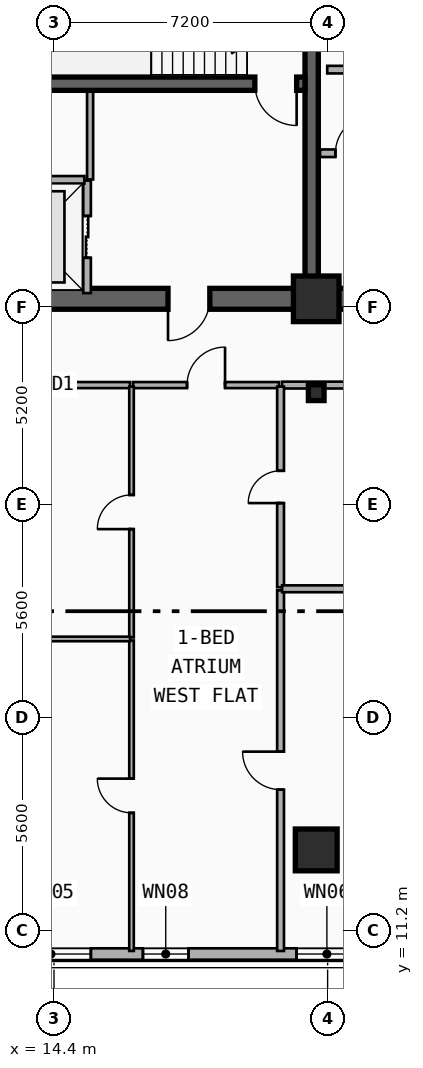
"""IFC4 building model, lengths in metres.
Left out: names, types, materials, properties, quantities, classifications, styles, units other than length and angle.
Written with IfcOpenShell. Run it as: python <this file> out.ifc"""

import sys

from ifc_helpers import new_model, si_unit, direction, frame, frame_2d, origin, origin_2d, place, context, subcontext, project, spatial, rectangle, i_section, extrude, element, fill, save


model = new_model("IFC4")
c1 = context("Model", 3, precision=1e-05, world=origin(), true_north=direction((0.0, 1.0)))
c2 = subcontext(c1, "Body", "Model", "MODEL_VIEW")
j1 = project(units=[si_unit("LENGTHUNIT", "METRE"), si_unit("PLANEANGLEUNIT", "RADIAN")], contexts=[c1])
p1 = place(None, origin())
s1 = spatial("IfcSite", under=j1, at=p1, CompositionType="ELEMENT")
p2 = place(p1, origin())
s2 = spatial("IfcBuilding", under=s1, at=p2, CompositionType="ELEMENT")
p3 = place(p2, frame((0.0, 0.0, 141.25)))
s3 = spatial("IfcBuildingStorey", under=s2, at=p3, CompositionType="ELEMENT", Elevation=141.25)
p4 = place(p3, frame((21.18, 27.82, 0.0), z_axis=(0.0, 0.0, 1.0), x_axis=(-1.0, 0.0, 0.0)))
e1 = element("IfcWall", 1, at=p4, inside=s3, PredefinedType="SHEAR", context=c2, shape_type="SweptSolid", body=[
    extrude(rectangle(XDim=9.03, YDim=0.55, at=frame_2d((4.515, 0.0))), origin(), (0.0, 0.0, 1.0), 3.55),
])
p5 = place(p4, frame((2.68, 0.0, 0.0)))
e2 = element("IfcOpeningElement", 2, at=p5, cuts=e1, PredefinedType="OPENING", context=c2, shape_type="SweptSolid", body=[
    extrude(rectangle(XDim=1.1, YDim=2.15, at=frame_2d((0.55, 1.075))), frame((0.0, 0.285, 0.0), z_axis=(0.0, -1.0, 0.0), x_axis=(1.0, 0.0, 0.0)), (0.0, 0.0, 1.0), 0.57),
])
p6 = place(p3, frame((33.15, 27.82, 0.0), z_axis=(0.0, 0.0, 1.0), x_axis=(-1.0, 0.0, 0.0)))
e3 = element("IfcWall", 3, at=p6, inside=s3, PredefinedType="SHEAR", context=c2, shape_type="SweptSolid", body=[
    extrude(rectangle(XDim=11.97, YDim=0.55, at=frame_2d((5.985, 0.0))), origin(), (0.0, 0.0, 1.0), 3.55),
])
p7 = place(p6, frame((6.1, 0.0, 0.0)))
e4 = element("IfcOpeningElement", 4, at=p7, cuts=e3, PredefinedType="OPENING", context=c2, shape_type="SweptSolid", body=[
    extrude(rectangle(XDim=1.6, YDim=2.2, at=frame_2d((0.8, 1.1))), frame((0.0, 0.285, 0.0), z_axis=(0.0, -1.0, 0.0), x_axis=(1.0, 0.0, 0.0)), (0.0, 0.0, 1.0), 0.57),
])
p8 = place(p3, frame((21.18, 28.095, 0.0), z_axis=(0.0, 0.0, 1.0), x_axis=(0.0, 1.0, 0.0)))
e5 = element("IfcWall", 5, at=p8, inside=s3, PredefinedType="SHEAR", context=c2, shape_type="SweptSolid", body=[
    extrude(rectangle(XDim=8.68, YDim=0.35, at=frame_2d((4.34, 0.0))), origin(), (0.0, 0.0, 1.0), 3.55),
])
p9 = place(p3, frame((21.005, 33.48, 0.0), z_axis=(0.0, 0.0, 1.0), x_axis=(-1.0, 0.0, 0.0)))
e6 = element("IfcWall", 6, at=p9, inside=s3, PredefinedType="SHEAR", context=c2, shape_type="SweptSolid", body=[
    extrude(rectangle(XDim=8.58, YDim=0.35, at=frame_2d((4.29, 0.0))), origin(), (0.0, 0.0, 1.0), 3.55),
])
p10 = place(p9, frame((0.22, 0.0, 0.0)))
e7 = element("IfcOpeningElement", 7, at=p10, cuts=e6, PredefinedType="OPENING", context=c2, shape_type="SweptSolid", body=[
    extrude(rectangle(XDim=1.1, YDim=2.15, at=frame_2d((0.55, 1.075))), frame((0.0, 0.185, 0.0), z_axis=(0.0, -1.0, 0.0), x_axis=(1.0, 0.0, 0.0)), (0.0, 0.0, 1.0), 0.37),
])
p11 = place(p3, frame((21.3, 27.82, 0.0), z_axis=(0.0, 0.0, 1.0), x_axis=(1.0, 0.0, 0.0)))
e8 = element("IfcColumn", 8, at=p11, inside=s3, PredefinedType="COLUMN", context=c2, shape_type="SweptSolid", body=[
    extrude(rectangle(XDim=1.2, YDim=1.2, at=origin_2d()), origin(), (0.0, 0.0, 1.0), 3.55),
])
p12 = place(p3, frame((21.3, 25.35, 0.0), z_axis=(0.0, 0.0, 1.0), x_axis=(1.0, 0.0, 0.0)))
e9 = element("IfcColumn", 9, at=p12, inside=s3, PredefinedType="COLUMN", context=c2, shape_type="SweptSolid", body=[
    extrude(i_section(OverallWidth=0.413, OverallDepth=0.415, WebThickness=0.03, FlangeThickness=0.047, FilletRadius=0.015, at=origin_2d()), origin(), (0.0, 0.0, 1.0), 3.55),
])
p13 = place(p3, frame((21.3, 13.428, 0.0), z_axis=(0.0, -0.0902702026, 0.995917311087), x_axis=(1.0, 0.0, 0.0)))
e10 = element("IfcColumn", 10, at=p13, inside=s3, PredefinedType="COLUMN", context=c2, shape_type="SweptSolid", body=[
    extrude(rectangle(XDim=1.1, YDim=1.1, at=origin_2d()), origin(), (0.0, 0.0, 1.0), 3.565),
])
p14 = place(p3, frame((48.0, 10.58, 0.0), z_axis=(0.0, 0.0, 1.0), x_axis=(-1.0, 0.0, 0.0)))
e11 = element("IfcWall", 11, at=p14, inside=s3, PredefinedType="SOLIDWALL", context=c2, shape_type="SweptSolid", body=[
    extrude(rectangle(XDim=38.4, YDim=0.3, at=frame_2d((19.2, 0.0))), origin(), (0.0, 0.0, 1.0), 3.29),
])
p15 = place(p14, frame((36.19, 0.0, 0.48)))
e12 = element("IfcOpeningElement", 12, at=p15, cuts=e11, PredefinedType="OPENING", context=c2, shape_type="SweptSolid", body=[
    extrude(rectangle(XDim=1.8, YDim=1.8, at=frame_2d((0.9, 0.9))), frame((0.0, 0.16, 0.0), z_axis=(0.0, -1.0, 0.0), x_axis=(1.0, 0.0, 0.0)), (0.0, 0.0, 1.0), 0.32),
])
p16 = place(p14, frame((30.06, 0.0, 0.68)))
e13 = element("IfcOpeningElement", 13, at=p16, cuts=e11, PredefinedType="OPENING", context=c2, shape_type="SweptSolid", body=[
    extrude(rectangle(XDim=1.2, YDim=1.5, at=frame_2d((0.6, 0.75))), frame((0.0, 0.16, 0.0), z_axis=(0.0, -1.0, 0.0), x_axis=(1.0, 0.0, 0.0)), (0.0, 0.0, 1.0), 0.32),
])
p17 = place(p14, frame((25.619, 0.0, 0.34)))
e14 = element("IfcOpeningElement", 14, at=p17, cuts=e11, PredefinedType="OPENING", context=c2, shape_type="SweptSolid", body=[
    extrude(rectangle(XDim=1.6, YDim=1.95, at=frame_2d((0.8, 0.975))), frame((0.0, 0.16, 0.0), z_axis=(0.0, -1.0, 0.0), x_axis=(1.0, 0.0, 0.0)), (0.0, 0.0, 1.0), 0.32),
])
p18 = place(p14, frame((32.63, 0.0, 0.65)))
e15 = element("IfcOpeningElement", 15, at=p18, cuts=e11, PredefinedType="OPENING", context=c2, shape_type="SweptSolid", body=[
    extrude(rectangle(XDim=2.1, YDim=2.1, at=frame_2d((1.05, 1.05))), frame((0.0, 0.16, 0.0), z_axis=(0.0, -1.0, 0.0), x_axis=(1.0, 0.0, 0.0)), (0.0, 0.0, 1.0), 0.32),
])
p19 = place(p14, frame((20.1, 0.0, 0.65)))
e16 = element("IfcOpeningElement", 16, at=p19, cuts=e11, PredefinedType="OPENING", context=c2, shape_type="SweptSolid", body=[
    extrude(rectangle(XDim=2.1, YDim=2.1, at=frame_2d((1.05, 1.05))), frame((0.0, 0.16, 0.0), z_axis=(0.0, -1.0, 0.0), x_axis=(1.0, 0.0, 0.0)), (0.0, 0.0, 1.0), 0.32),
])
p20 = place(p14, frame((22.95, 0.0, 0.8)))
e17 = element("IfcOpeningElement", 17, at=p20, cuts=e11, PredefinedType="OPENING", context=c2, shape_type="SweptSolid", body=[
    extrude(rectangle(XDim=1.8, YDim=1.8, at=frame_2d((0.9, 0.9))), frame((0.0, 0.16, 0.0), z_axis=(0.0, -1.0, 0.0), x_axis=(1.0, 0.0, 0.0)), (0.0, 0.0, 1.0), 0.32),
])
p21 = place(p14, frame((13.35, 0.0, 0.65)))
e18 = element("IfcOpeningElement", 18, at=p21, cuts=e11, PredefinedType="OPENING", context=c2, shape_type="SweptSolid", body=[
    extrude(rectangle(XDim=2.1, YDim=2.1, at=frame_2d((1.05, 1.05))), frame((0.0, 0.16, 0.0), z_axis=(0.0, -1.0, 0.0), x_axis=(1.0, 0.0, 0.0)), (0.0, 0.0, 1.0), 0.32),
])
p22 = place(p14, frame((6.944, 0.0, 0.65)))
e19 = element("IfcOpeningElement", 19, at=p22, cuts=e11, PredefinedType="OPENING", context=c2, shape_type="SweptSolid", body=[
    extrude(rectangle(XDim=2.1, YDim=2.1, at=frame_2d((1.05, 1.05))), frame((0.0, 0.16, 0.0), z_axis=(0.0, -1.0, 0.0), x_axis=(1.0, 0.0, 0.0)), (0.0, 0.0, 1.0), 0.32),
])
p23 = place(p14, frame((2.9, 0.0, 0.48)))
e20 = element("IfcOpeningElement", 20, at=p23, cuts=e11, PredefinedType="OPENING", context=c2, shape_type="SweptSolid", body=[
    extrude(rectangle(XDim=1.4, YDim=1.8, at=frame_2d((0.7, 0.9))), frame((0.0, 0.16, 0.0), z_axis=(0.0, -1.0, 0.0), x_axis=(1.0, 0.0, 0.0)), (0.0, 0.0, 1.0), 0.32),
])
p24 = place(p14, frame((0.41, 0.0, 0.48)))
e21 = element("IfcOpeningElement", 21, at=p24, cuts=e11, PredefinedType="OPENING", context=c2, shape_type="SweptSolid", body=[
    extrude(rectangle(XDim=1.8, YDim=1.8, at=frame_2d((0.9, 0.9))), frame((0.0, 0.16, 0.0), z_axis=(0.0, -1.0, 0.0), x_axis=(1.0, 0.0, 0.0)), (0.0, 0.0, 1.0), 0.32),
])
p25 = place(p3, frame((15.27, 27.97, 0.0), z_axis=(0.0, 0.0, 1.0), x_axis=(0.0, 1.0, 0.0)))
e22 = element("IfcWall", 22, at=p25, inside=s3, PredefinedType="PARTITIONING", context=c2, shape_type="SweptSolid", body=[
    extrude(rectangle(XDim=2.96, YDim=0.2, at=frame_2d((1.48, 0.0))), origin(), (0.0, 0.0, 1.0), 2.36),
])
p26 = place(p25, frame((0.93, 0.0, 0.0)))
e23 = element("IfcOpeningElement", 23, at=p26, cuts=e22, PredefinedType="OPENING", context=c2, shape_type="SweptSolid", body=[
    extrude(rectangle(XDim=1.1, YDim=2.15, at=frame_2d((0.55, 1.075))), frame((0.0, 0.11, 0.0), z_axis=(0.0, -1.0, 0.0), x_axis=(1.0, 0.0, 0.0)), (0.0, 0.0, 1.0), 0.22),
])
p27 = place(p3, frame((12.45, 30.95, 0.0), z_axis=(0.0, 0.0, 1.0), x_axis=(1.0, 0.0, 0.0)))
e24 = element("IfcWall", 24, at=p27, inside=s3, PredefinedType="PARTITIONING", context=c2, shape_type="SweptSolid", body=[
    extrude(rectangle(XDim=2.75, YDim=0.2, at=frame_2d((1.375, 0.0))), origin(), (0.0, 0.0, 1.0), 2.36),
])
p28 = place(p3, frame((21.4, 31.65, 0.0), z_axis=(0.0, 0.0, 1.0), x_axis=(1.0, 0.0, 0.0)))
e25 = element("IfcWall", 25, at=p28, inside=s3, PredefinedType="PARTITIONING", context=c2, shape_type="SweptSolid", body=[
    extrude(rectangle(XDim=1.81, YDim=0.2, at=frame_2d((0.905, 0.0))), origin(), (0.0, 0.0, 1.0), 2.36),
])
p29 = place(p28, frame((0.405, 0.0, 0.0)))
e26 = element("IfcOpeningElement", 26, at=p29, cuts=e25, PredefinedType="OPENING", context=c2, shape_type="SweptSolid", body=[
    extrude(rectangle(XDim=1.0, YDim=2.15, at=frame_2d((0.5, 1.075))), frame((0.0, 0.11, 0.0), z_axis=(0.0, -1.0, 0.0), x_axis=(1.0, 0.0, 0.0)), (0.0, 0.0, 1.0), 0.22),
])
p30 = place(p3, frame((21.59, 33.85, 0.0), z_axis=(0.0, 0.0, 1.0), x_axis=(1.0, 0.0, 0.0)))
e27 = element("IfcWall", 27, at=p30, inside=s3, PredefinedType="PARTITIONING", context=c2, shape_type="SweptSolid", body=[
    extrude(rectangle(XDim=5.92, YDim=0.2, at=frame_2d((2.96, 0.0))), origin(), (0.0, 0.0, 1.0), 2.36),
])
p31 = place(p30, frame((2.36, 0.0, 0.0)))
e28 = element("IfcOpeningElement", 28, at=p31, cuts=e27, PredefinedType="OPENING", context=c2, shape_type="SweptSolid", body=[
    extrude(rectangle(XDim=1.2, YDim=2.15, at=frame_2d((0.6, 1.075))), frame((0.0, 0.11, 0.0), z_axis=(0.0, -1.0, 0.0), x_axis=(1.0, 0.0, 0.0)), (0.0, 0.0, 1.0), 0.22),
])
p32 = place(p3, frame((16.48, 25.55, 0.0), z_axis=(0.0, 0.0, 1.0), x_axis=(1.0, 0.0, 0.0)))
e29 = element("IfcWall", 29, at=p32, inside=s3, PredefinedType="PARTITIONING", context=c2, shape_type="SweptSolid", body=[
    extrude(rectangle(XDim=3.842, YDim=0.16, at=frame_2d((1.921, 0.0))), origin(), (0.0, 0.0, 1.0), 3.29),
])
p33 = place(p32, frame((1.421, 0.0, 0.0)))
e30 = element("IfcOpeningElement", 30, at=p33, cuts=e29, PredefinedType="OPENING", context=c2, shape_type="SweptSolid", body=[
    extrude(rectangle(XDim=1.0, YDim=2.15, at=frame_2d((0.5, 1.075))), frame((0.0, 0.09, 0.0), z_axis=(0.0, -1.0, 0.0), x_axis=(1.0, 0.0, 0.0)), (0.0, 0.0, 1.0), 0.18),
])
p34 = place(p3, frame((20.402, 25.55, 0.0), z_axis=(0.0, 0.0, 1.0), x_axis=(1.0, 0.0, 0.0)))
e31 = element("IfcWall", 31, at=p34, inside=s3, PredefinedType="PLUMBINGWALL", context=c2, shape_type="SweptSolid", body=[
    extrude(rectangle(XDim=2.358, YDim=0.18, at=frame_2d((1.179, 0.0))), origin(), (0.0, 0.0, 1.0), 2.456),
])
p35 = place(p3, frame((12.24, 25.55, 0.0), z_axis=(0.0, 0.0, 1.0), x_axis=(1.0, 0.0, 0.0)))
e32 = element("IfcWall", 32, at=p35, inside=s3, PredefinedType="PARTITIONING", context=c2, shape_type="SweptSolid", body=[
    extrude(rectangle(XDim=4.16, YDim=0.16, at=frame_2d((2.08, 0.0))), origin(), (0.0, 0.0, 1.0), 2.456),
])
p36 = place(p3, frame((20.362, 10.66, 0.0), z_axis=(0.0, 0.0, 1.0), x_axis=(0.0, 1.0, 0.0)))
e33 = element("IfcWall", 33, at=p36, inside=s3, PredefinedType="PLUMBINGWALL", context=c2, shape_type="SweptSolid", body=[
    extrude(rectangle(XDim=9.49, YDim=0.18, at=frame_2d((4.745, 0.0))), origin(), (0.0, 0.0, 1.0), 2.72),
])
p37 = place(p36, frame((4.245, 0.0, 0.0)))
e34 = element("IfcOpeningElement", 34, at=p37, cuts=e33, PredefinedType="OPENING", context=c2, shape_type="SweptSolid", body=[
    extrude(rectangle(XDim=1.0, YDim=2.15, at=frame_2d((0.5, 1.075))), frame((0.0, 0.1, 0.0), z_axis=(0.0, -1.0, 0.0), x_axis=(1.0, 0.0, 0.0)), (0.0, 0.0, 1.0), 0.2),
])
p38 = place(p3, frame((20.362, 20.23, 0.0), z_axis=(0.0, 0.0, 1.0), x_axis=(0.0, 1.0, 0.0)))
e35 = element("IfcWall", 35, at=p38, inside=s3, PredefinedType="PLUMBINGWALL", context=c2, shape_type="SweptSolid", body=[
    extrude(rectangle(XDim=5.28, YDim=0.18, at=frame_2d((2.64, 0.0))), origin(), (0.0, 0.0, 1.0), 2.72),
])
p39 = place(p38, frame((2.215, 0.0, 0.0)))
e36 = element("IfcOpeningElement", 36, at=p39, cuts=e35, PredefinedType="OPENING", context=c2, shape_type="SweptSolid", body=[
    extrude(rectangle(XDim=0.85, YDim=2.1, at=frame_2d((0.425, 1.05))), frame((0.0, 0.1, 0.0), z_axis=(0.0, -1.0, 0.0), x_axis=(1.0, 0.0, 0.0)), (0.0, 0.0, 1.0), 0.2),
])
p40 = place(p3, frame((16.44, 10.66, 0.0), z_axis=(0.0, 0.0, 1.0), x_axis=(0.0, 1.0, 0.0)))
e37 = element("IfcWall", 37, at=p40, inside=s3, PredefinedType="PARTITIONING", context=c2, shape_type="SweptSolid", body=[
    extrude(rectangle(XDim=8.17, YDim=0.12, at=frame_2d((4.085, 0.0))), origin(), (0.0, 0.0, 1.0), 2.88),
])
p41 = place(p40, frame((3.635, 0.0, 0.0)))
e38 = element("IfcOpeningElement", 38, at=p41, cuts=e37, PredefinedType="OPENING", context=c2, shape_type="SweptSolid", body=[
    extrude(rectangle(XDim=0.9, YDim=2.1, at=frame_2d((0.45, 1.05))), frame((0.0, 0.07, 0.0), z_axis=(0.0, -1.0, 0.0), x_axis=(1.0, 0.0, 0.0)), (0.0, 0.0, 1.0), 0.14),
])
p42 = place(p3, frame((16.44, 18.91, 0.0), z_axis=(0.0, 0.0, 1.0), x_axis=(0.0, 1.0, 0.0)))
e39 = element("IfcWall", 39, at=p42, inside=s3, PredefinedType="PARTITIONING", context=c2, shape_type="SweptSolid", body=[
    extrude(rectangle(XDim=6.6, YDim=0.12, at=frame_2d((3.3, 0.0))), origin(), (0.0, 0.0, 1.0), 2.72),
])
p43 = place(p42, frame((2.85, 0.0, 0.0)))
e40 = element("IfcOpeningElement", 40, at=p43, cuts=e39, PredefinedType="OPENING", context=c2, shape_type="SweptSolid", body=[
    extrude(rectangle(XDim=0.9, YDim=2.1, at=frame_2d((0.45, 1.05))), frame((0.0, 0.07, 0.0), z_axis=(0.0, -1.0, 0.0), x_axis=(1.0, 0.0, 0.0)), (0.0, 0.0, 1.0), 0.14),
])
p44 = place(p3, frame((20.402, 20.19, 0.0), z_axis=(0.0, 0.0, 1.0), x_axis=(1.0, 0.0, 0.0)))
e41 = element("IfcWall", 41, at=p44, inside=s3, PredefinedType="PLUMBINGWALL", context=c2, shape_type="SweptSolid", body=[
    extrude(rectangle(XDim=2.358, YDim=0.18, at=frame_2d((1.179, 0.0))), origin(), (0.0, 0.0, 1.0), 2.456),
])
p45 = place(p3, frame((12.24, 18.87, 0.0), z_axis=(0.0, 0.0, 1.0), x_axis=(1.0, 0.0, 0.0)))
e42 = element("IfcWall", 42, at=p45, inside=s3, PredefinedType="PARTITIONING", context=c2, shape_type="SweptSolid", body=[
    extrude(rectangle(XDim=4.16, YDim=0.12, at=frame_2d((2.08, 0.0))), origin(), (0.0, 0.0, 1.0), 2.456),
])
p46 = place(p3, frame((15.35, 30.96, 0.0), z_axis=(0.0, 0.0, 1.0), x_axis=(0.0, 1.0, 0.0)))
e43 = element("IfcWall", 43, at=p46, inside=s3, PredefinedType="PARTITIONING", context=c2, shape_type="SweptSolid", body=[
    extrude(rectangle(XDim=2.31, YDim=0.16, at=frame_2d((1.155, 0.0))), origin(), (0.0, 0.0, 1.0), 3.29),
])
p47 = place(p16, origin())
e44 = element("IfcWindow", 44, at=p47, inside=s3, PartitioningType="SINGLE_PANEL", PredefinedType="WINDOW", context=c2, shape_type="SweptSolid", body=[
    extrude(rectangle(XDim=1.2, YDim=1.5, at=frame_2d((0.6, 0.75))), frame((0.0, 0.03, 0.0), z_axis=(0.0, -1.0, 0.0), x_axis=(1.0, 0.0, 0.0)), (0.0, 0.0, 1.0), 0.06),
])
fill(e13, e44)
p48 = place(p17, origin())
e45 = element("IfcWindow", 45, at=p48, inside=s3, PartitioningType="SINGLE_PANEL", PredefinedType="WINDOW", context=c2, shape_type="SweptSolid", body=[
    extrude(rectangle(XDim=1.6, YDim=1.95, at=frame_2d((0.8, 0.975))), frame((0.0, 0.03, 0.0), z_axis=(0.0, -1.0, 0.0), x_axis=(1.0, 0.0, 0.0)), (0.0, 0.0, 1.0), 0.06),
])
fill(e14, e45)
p49 = place(p18, origin())
e46 = element("IfcWindow", 46, at=p49, inside=s3, PartitioningType="SINGLE_PANEL", PredefinedType="WINDOW", context=c2, shape_type="SweptSolid", body=[
    extrude(rectangle(XDim=2.1, YDim=2.1, at=frame_2d((1.05, 1.05))), frame((0.0, 0.03, 0.0), z_axis=(0.0, -1.0, 0.0), x_axis=(1.0, 0.0, 0.0)), (0.0, 0.0, 1.0), 0.06),
])
fill(e15, e46)
p50 = place(p26, origin())
e47 = element("IfcDoor", 47, at=p50, inside=s3, OperationType="DOUBLE_DOOR_SLIDING", PredefinedType="DOOR", context=c2, shape_type="SweptSolid", body=[
    extrude(rectangle(XDim=1.1, YDim=2.15, at=frame_2d((0.55, 1.075))), frame((0.0, 0.025, 0.0), z_axis=(0.0, -1.0, 0.0), x_axis=(1.0, 0.0, 0.0)), (0.0, 0.0, 1.0), 0.05),
])
fill(e23, e47)
p51 = place(p10, origin())
e48 = element("IfcDoor", 48, at=p51, inside=s3, OperationType="SINGLE_SWING_LEFT", PredefinedType="DOOR", context=c2, shape_type="SweptSolid", body=[
    extrude(rectangle(XDim=1.1, YDim=2.15, at=frame_2d((0.55, 1.075))), frame((0.0, 0.025, 0.0), z_axis=(0.0, -1.0, 0.0), x_axis=(1.0, 0.0, 0.0)), (0.0, 0.0, 1.0), 0.05),
])
fill(e7, e48)
p52 = place(p5, origin())
e49 = element("IfcDoor", 49, at=p52, inside=s3, OperationType="SINGLE_SWING_RIGHT", PredefinedType="DOOR", context=c2, shape_type="SweptSolid", body=[
    extrude(rectangle(XDim=1.1, YDim=2.15, at=frame_2d((0.55, 1.075))), frame((0.0, 0.025, 0.0), z_axis=(0.0, -1.0, 0.0), x_axis=(1.0, 0.0, 0.0)), (0.0, 0.0, 1.0), 0.05),
])
fill(e2, e49)
p53 = place(p29, origin())
e50 = element("IfcDoor", 50, at=p53, inside=s3, OperationType="SINGLE_SWING_RIGHT", PredefinedType="DOOR", context=c2, shape_type="SweptSolid", body=[
    extrude(rectangle(XDim=1.0, YDim=2.15, at=frame_2d((0.5, 1.075))), frame((0.0, 0.025, 0.0), z_axis=(0.0, -1.0, 0.0), x_axis=(1.0, 0.0, 0.0)), (0.0, 0.0, 1.0), 0.05),
])
fill(e26, e50)
p54 = place(p33, origin())
e51 = element("IfcDoor", 51, at=p54, inside=s3, OperationType="SINGLE_SWING_RIGHT", PredefinedType="DOOR", context=c2, shape_type="SweptSolid", body=[
    extrude(rectangle(XDim=1.0, YDim=2.15, at=frame_2d((0.5, 1.075))), frame((0.0, 0.025, 0.0), z_axis=(0.0, -1.0, 0.0), x_axis=(1.0, 0.0, 0.0)), (0.0, 0.0, 1.0), 0.05),
])
fill(e30, e51)
p55 = place(p37, origin())
e52 = element("IfcDoor", 52, at=p55, inside=s3, OperationType="SINGLE_SWING_RIGHT", PredefinedType="DOOR", context=c2, shape_type="SweptSolid", body=[
    extrude(rectangle(XDim=1.0, YDim=2.15, at=frame_2d((0.5, 1.075))), frame((0.0, 0.025, 0.0), z_axis=(0.0, -1.0, 0.0), x_axis=(1.0, 0.0, 0.0)), (0.0, 0.0, 1.0), 0.05),
])
fill(e34, e52)
p56 = place(p39, origin())
e53 = element("IfcDoor", 53, at=p56, inside=s3, OperationType="SINGLE_SWING_LEFT", PredefinedType="DOOR", context=c2, shape_type="SweptSolid", body=[
    extrude(rectangle(XDim=0.85, YDim=2.1, at=frame_2d((0.425, 1.05))), frame((0.0, 0.025, 0.0), z_axis=(0.0, -1.0, 0.0), x_axis=(1.0, 0.0, 0.0)), (0.0, 0.0, 1.0), 0.05),
])
fill(e36, e53)
p57 = place(p41, origin())
e54 = element("IfcDoor", 54, at=p57, inside=s3, OperationType="SINGLE_SWING_RIGHT", PredefinedType="DOOR", context=c2, shape_type="SweptSolid", body=[
    extrude(rectangle(XDim=0.9, YDim=2.1, at=frame_2d((0.45, 1.05))), frame((0.0, 0.025, 0.0), z_axis=(0.0, -1.0, 0.0), x_axis=(1.0, 0.0, 0.0)), (0.0, 0.0, 1.0), 0.05),
])
fill(e38, e54)
p58 = place(p43, origin())
e55 = element("IfcDoor", 55, at=p58, inside=s3, OperationType="SINGLE_SWING_LEFT", PredefinedType="DOOR", context=c2, shape_type="SweptSolid", body=[
    extrude(rectangle(XDim=0.9, YDim=2.1, at=frame_2d((0.45, 1.05))), frame((0.0, 0.025, 0.0), z_axis=(0.0, -1.0, 0.0), x_axis=(1.0, 0.0, 0.0)), (0.0, 0.0, 1.0), 0.05),
])
fill(e40, e55)
save(model, sys.argv[1])
